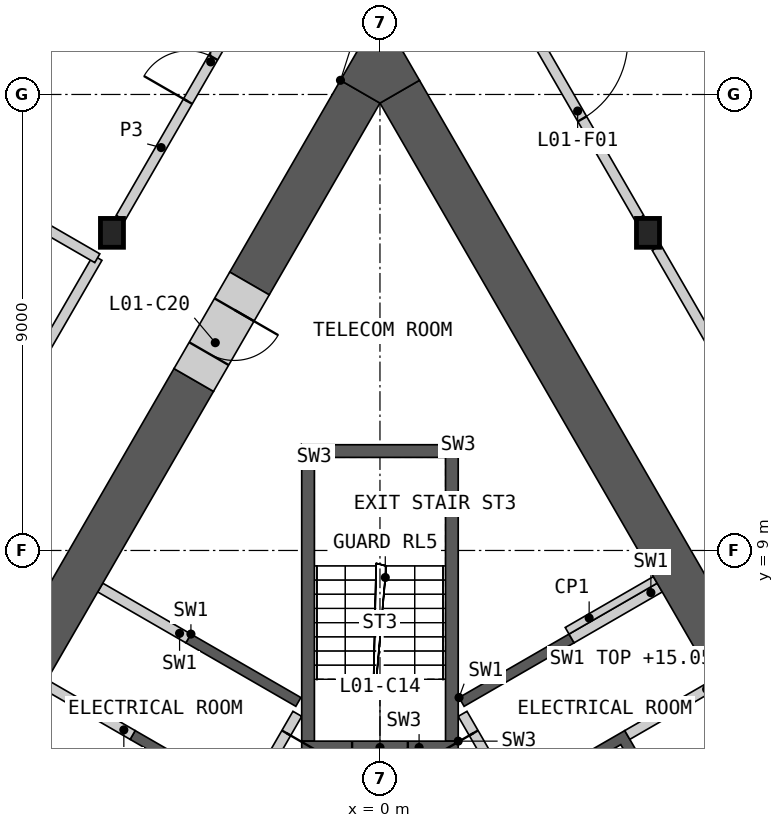
"""IFC4 building model, lengths in metres.
Left out: names, types, materials, properties, quantities, classifications, styles, units other than length and angle.
Written with IfcOpenShell. Run it as: python <this file> out.ifc"""

import sys

from ifc_helpers import new_model, si_unit, direction, frame, frame_2d, origin, origin_2d, place, context, subcontext, project, spatial, polyline, rectangle, i_section, outline, extrude, element, fill, save


model = new_model("IFC4")
c1 = context("Model", 3, precision=1e-05, world=origin(), true_north=direction((0.0, 1.0)))
c2 = subcontext(c1, "Body", "Model", "MODEL_VIEW")
j1 = project(units=[si_unit("LENGTHUNIT", "METRE"), si_unit("PLANEANGLEUNIT", "RADIAN")], contexts=[c1])
p1 = place(None, origin())
s1 = spatial("IfcSite", under=j1, at=p1, CompositionType="ELEMENT")
p2 = place(p1, origin())
s2 = spatial("IfcBuilding", under=s1, at=p2, CompositionType="ELEMENT")
p3 = place(p2, frame((0.0, 0.0, 10.0)))
s3 = spatial("IfcBuildingStorey", under=s2, at=p3, CompositionType="ELEMENT", Elevation=10.0)
for number, where, z_axis, x_axis in (
    (1, (-5.289, 15.269, 0.0), (0.0, 0.0, 1.0), (1.0, 0.0, 0.0)),
    (2, (5.289, 15.269, 0.0), (0.0, 0.0, 1.0), (1.0, 0.0, 0.0)),
):
    element("IfcColumn", number, at=place(p3, frame(where, z_axis=z_axis, x_axis=x_axis)), inside=s3, PredefinedType="COLUMN", context=c2, shape_type="SweptSolid", body=[
        extrude(i_section(OverallWidth=0.454, OverallDepth=0.57, WebThickness=0.078, FlangeThickness=0.125, at=origin_2d()), origin(), (0.0, 0.0, 1.0), 5.5),
    ])
p4 = place(p3, origin())
e3 = element("IfcWall", 3, at=p4, inside=s3, PredefinedType="SHEAR", context=c2, shape_type="SweptSolid", body=[
    extrude(outline(polyline([(1.561, 6.097), (3.731, 7.35), (3.831, 7.177), (1.66, 5.924), (1.561, 6.097)])), origin(), (0.0, 0.0, 1.0), 5.05),
])
p5 = place(p3, origin())
e4 = element("IfcWall", 4, at=p5, inside=s3, PredefinedType="SHEAR", context=c2, shape_type="SweptSolid", body=[
    extrude(outline(polyline([(2.66, 4.192), (4.831, 5.445), (8.231, -0.444), (6.061, -1.697), (5.96, -1.524), (7.952, -0.374), (6.952, 1.358), (4.96, 0.208), (4.861, 0.381), (6.852, 1.531), (5.852, 3.263), (3.861, 2.113), (3.76, 2.287), (5.752, 3.437), (4.752, 5.169), (2.76, 4.019), (2.66, 4.192)])), origin(), (0.0, 0.0, 1.0), 5.05),
])
p6 = place(p3, frame((5.817, -1.476, 0.0), z_axis=(0.0, 0.0, 1.0), x_axis=(-0.500002616675, 0.866023893041, 0.0)))
e5 = element("IfcWall", 5, at=p6, inside=s3, PredefinedType="SOLIDWALL", context=c2, shape_type="SweptSolid", body=[
    extrude(rectangle(XDim=8.373, YDim=0.2, at=frame_2d((4.187, 0.0))), origin(), (0.0, 0.0, 1.0), 5.05),
])
p7 = place(p6, frame((0.337, 0.0, 0.0)))
e6 = element("IfcOpeningElement", 6, at=p7, cuts=e5, PredefinedType="OPENING", context=c2, shape_type="SweptSolid", body=[
    extrude(rectangle(XDim=1.1, YDim=2.1, at=frame_2d((0.55, 1.05))), frame((0.0, 0.11, 0.0), z_axis=(0.0, -1.0, 0.0), x_axis=(1.0, 0.0, 0.0)), (0.0, 0.0, 1.0), 0.22),
])
p8 = place(p6, frame((2.537, 0.0, 0.0)))
e7 = element("IfcOpeningElement", 7, at=p8, cuts=e5, PredefinedType="OPENING", context=c2, shape_type="SweptSolid", body=[
    extrude(rectangle(XDim=1.1, YDim=2.1, at=frame_2d((0.55, 1.05))), frame((0.0, 0.11, 0.0), z_axis=(0.0, -1.0, 0.0), x_axis=(1.0, 0.0, 0.0)), (0.0, 0.0, 1.0), 0.22),
])
p9 = place(p6, frame((4.737, 0.0, 0.0)))
e8 = element("IfcOpeningElement", 8, at=p9, cuts=e5, PredefinedType="OPENING", context=c2, shape_type="SweptSolid", body=[
    extrude(rectangle(XDim=1.1, YDim=2.1, at=frame_2d((0.55, 1.05))), frame((0.0, 0.11, 0.0), z_axis=(0.0, -1.0, 0.0), x_axis=(1.0, 0.0, 0.0)), (0.0, 0.0, 1.0), 0.22),
])
p10 = place(p6, frame((7.037, 0.0, 0.0)))
e9 = element("IfcOpeningElement", 9, at=p10, cuts=e5, PredefinedType="OPENING", context=c2, shape_type="SweptSolid", body=[
    extrude(rectangle(XDim=0.9, YDim=2.1, at=frame_2d((0.45, 1.05))), frame((0.0, 0.11, 0.0), z_axis=(0.0, -1.0, 0.0), x_axis=(1.0, 0.0, 0.0)), (0.0, 0.0, 1.0), 0.22),
])
p11 = place(p3, frame((4.881, 5.358, 0.0), z_axis=(0.0, 0.0, 1.0), x_axis=(0.866035824272, 0.499981950752, 0.0)))
e10 = element("IfcWall", 10, at=p11, inside=s3, PredefinedType="SHEAR", context=c2, shape_type="SweptSolid", body=[
    extrude(rectangle(XDim=2.009, YDim=0.2, at=frame_2d((1.004, 0.0))), origin(), (0.0, 0.0, 1.0), 5.05),
])
p12 = place(p3, frame((3.781, 7.263, 0.0), z_axis=(0.0, 0.0, 1.0), x_axis=(0.865983199114, 0.50007309351, 0.0)))
e11 = element("IfcWall", 11, at=p12, inside=s3, PredefinedType="SHEAR", context=c2, shape_type="SweptSolid", body=[
    extrude(rectangle(XDim=2.009, YDim=0.2, at=frame_2d((1.004, 0.0))), origin(), (0.0, 0.0, 1.0), 5.05),
])
p13 = place(p3, origin())
e12 = element("IfcWall", 12, at=p13, inside=s3, PredefinedType="SHEAR", context=c2, shape_type="SweptSolid", body=[
    extrude(outline(polyline([(-2.76, 4.019), (-4.931, 5.272), (-4.831, 5.445), (-2.66, 4.192), (-2.76, 4.019)])), origin(), (0.0, 0.0, 1.0), 5.05),
])
p14 = place(p3, origin())
e13 = element("IfcWall", 13, at=p14, inside=s3, PredefinedType="SHEAR", context=c2, shape_type="SweptSolid", body=[
    extrude(outline(polyline([(-3.731, 7.35), (-1.561, 6.097), (-1.66, 5.924), (-3.831, 7.177), (-3.731, 7.35)])), origin(), (0.0, 0.0, 1.0), 5.05),
])
p15 = place(p3, frame((-1.631, 5.776, 0.0), z_axis=(0.0, 0.0, 1.0), x_axis=(-0.499992876559, -0.866029516466, 0.0)))
e14 = element("IfcWall", 14, at=p15, inside=s3, PredefinedType="SOLIDWALL", context=c2, shape_type="SweptSolid", body=[
    extrude(rectangle(XDim=6.486, YDim=0.2, at=frame_2d((3.243, 0.0))), origin(), (0.0, 0.0, 1.0), 5.05),
])
p16 = place(p15, frame((0.437, 0.0, 0.0)))
e15 = element("IfcOpeningElement", 15, at=p16, cuts=e14, PredefinedType="OPENING", context=c2, shape_type="SweptSolid", body=[
    extrude(rectangle(XDim=0.9, YDim=2.1, at=frame_2d((0.45, 1.05))), frame((0.0, 0.11, 0.0), z_axis=(0.0, -1.0, 0.0), x_axis=(1.0, 0.0, 0.0)), (0.0, 0.0, 1.0), 0.22),
])
p17 = place(p15, frame((2.637, 0.0, 0.0)))
e16 = element("IfcOpeningElement", 16, at=p17, cuts=e14, PredefinedType="OPENING", context=c2, shape_type="SweptSolid", body=[
    extrude(rectangle(XDim=0.9, YDim=2.1, at=frame_2d((0.45, 1.05))), frame((0.0, 0.11, 0.0), z_axis=(0.0, -1.0, 0.0), x_axis=(1.0, 0.0, 0.0)), (0.0, 0.0, 1.0), 0.22),
])
p18 = place(p3, frame((-3.781, 7.263, 0.0), z_axis=(0.0, 0.0, 1.0), x_axis=(-0.865983199114, 0.50007309351, 0.0)))
e17 = element("IfcWall", 17, at=p18, inside=s3, PredefinedType="SHEAR", context=c2, shape_type="SweptSolid", body=[
    extrude(rectangle(XDim=2.009, YDim=0.2, at=frame_2d((1.004, 0.0))), origin(), (0.0, 0.0, 1.0), 5.05),
])
p19 = place(p3, frame((-4.881, 5.358, 0.0), z_axis=(0.0, 0.0, 1.0), x_axis=(-0.866035824272, 0.499981950752, 0.0)))
e18 = element("IfcWall", 18, at=p19, inside=s3, PredefinedType="SHEAR", context=c2, shape_type="SweptSolid", body=[
    extrude(rectangle(XDim=2.009, YDim=0.2, at=frame_2d((1.004, 0.0))), origin(), (0.0, 0.0, 1.0), 5.05),
])
p20 = place(p3, origin())
e19 = element("IfcWall", 19, at=p20, inside=s3, PredefinedType="SHEAR", context=c2, shape_type="SweptSolid", body=[
    extrude(outline(polyline([(1.544, 5.237), (1.544, 11.087), (1.294, 10.837), (1.294, 5.237), (1.544, 5.237)])), origin(), (0.0, 0.0, 1.0), 5.05),
])
p21 = place(p3, origin())
e20 = element("IfcWall", 20, at=p21, inside=s3, PredefinedType="SHEAR", context=c2, shape_type="SweptSolid", body=[
    extrude(outline(polyline([(1.544, 11.087), (-1.544, 11.087), (-1.294, 10.837), (1.294, 10.837), (1.544, 11.087)])), origin(), (0.0, 0.0, 1.0), 5.05),
])
p22 = place(p3, origin())
e21 = element("IfcWall", 21, at=p22, inside=s3, PredefinedType="SHEAR", context=c2, shape_type="SweptSolid", body=[
    extrude(outline(polyline([(-1.294, 10.837), (-1.544, 11.087), (-1.544, 5.237), (-1.294, 5.237), (-1.294, 10.837)])), origin(), (0.0, 0.0, 1.0), 5.05),
])
p23 = place(p3, frame((1.544, 5.112, 0.0), z_axis=(0.0, 0.0, 1.0), x_axis=(-1.0, 0.0, 0.0)))
e22 = element("IfcWall", 22, at=p23, inside=s3, PredefinedType="SHEAR", context=c2, shape_type="SweptSolid", body=[
    extrude(rectangle(XDim=3.088, YDim=0.25, at=frame_2d((1.544, 0.0))), origin(), (0.0, 0.0, 1.0), 5.05),
])
p24 = place(p23, frame((0.994, 0.0, 0.0)))
e23 = element("IfcOpeningElement", 23, at=p24, cuts=e22, PredefinedType="OPENING", context=c2, shape_type="SweptSolid", body=[
    extrude(rectangle(XDim=1.1, YDim=2.1, at=frame_2d((0.55, 1.05))), frame((0.0, 0.135, 0.0), z_axis=(0.0, -1.0, 0.0), x_axis=(1.0, 0.0, 0.0)), (0.0, 0.0, 1.0), 0.27),
])
p25 = place(p3, frame((3.693, 7.415, 0.0), z_axis=(0.0, 0.0, 1.0), x_axis=(0.866035824272, 0.499981950752, 0.0)))
e24 = element("IfcWall", 24, at=p25, inside=s3, PredefinedType="PARTITIONING", context=c2, shape_type="SweptSolid", body=[
    extrude(rectangle(XDim=2.009, YDim=0.15, at=frame_2d((1.004, 0.0))), origin(), (0.0, 0.0, 1.0), 5.05),
])
p26 = place(p3, frame((8.16, 4.596, 0.0), z_axis=(0.0, 0.0, 1.0), x_axis=(-0.500009830349, 0.866019728156, 0.0)))
e25 = element("IfcWall", 25, at=p26, inside=s3, PredefinedType="SHEAR", context=c2, shape_type="SweptSolid", body=[
    extrude(rectangle(XDim=15.541, YDim=0.9, at=frame_2d((7.771, 0.0))), origin(), (0.0, 0.0, 1.0), 5.05),
])
p27 = place(p3, frame((-3.675, 12.365, 0.0), z_axis=(0.0, 0.0, 1.0), x_axis=(-0.500014716158, -0.86601690724, 0.0)))
e26 = element("IfcWall", 26, at=p27, inside=s3, PredefinedType="SHEAR", context=c2, shape_type="SweptSolid", body=[
    extrude(rectangle(XDim=8.99, YDim=0.9, at=frame_2d((4.495, 0.0))), origin(), (0.0, 0.0, 1.0), 5.05),
])
p28 = place(p3, frame((-0.39, 18.055, 0.0), z_axis=(0.0, 0.0, 1.0), x_axis=(-0.500014193307, -0.86601720912, 0.0)))
e27 = element("IfcWall", 27, at=p28, inside=s3, PredefinedType="SHEAR", context=c2, shape_type="SweptSolid", body=[
    extrude(rectangle(XDim=4.37, YDim=0.9, at=frame_2d((2.185, 0.0))), origin(), (0.0, 0.0, 1.0), 5.05),
])
p29 = place(p3, origin())
e28 = element("IfcWall", 28, at=p29, inside=s3, PredefinedType="SHEAR", context=c2, shape_type="SweptSolid", body=[
    extrude(outline(polyline([(-0.779, 18.28), (0.0, 19.63), (0.779, 18.28), (0.0, 17.83), (-0.779, 18.28)])), origin(), (0.0, 0.0, 1.0), 5.05),
])
p30 = place(p3, frame((-2.575, 14.27, 0.0), z_axis=(0.0, 0.0, 1.0), x_axis=(-0.499981787252, -0.866035918664, 0.0)))
e29 = element("IfcWall", 29, at=p30, inside=s3, PredefinedType="SHEAR", context=c2, shape_type="SweptSolid", body=[
    extrude(rectangle(XDim=2.2, YDim=0.9, at=frame_2d((1.1, 0.0))), origin(), (0.0, 0.0, 1.0), 5.05),
])
p31 = place(p30, frame((0.6, 0.0, 0.0)))
e30 = element("IfcOpeningElement", 30, at=p31, cuts=e29, PredefinedType="OPENING", context=c2, shape_type="SweptSolid", body=[
    extrude(rectangle(XDim=1.0, YDim=2.1, at=frame_2d((0.5, 1.05))), frame((0.0, 0.46, 0.0), z_axis=(0.0, -1.0, 0.0), x_axis=(1.0, 0.0, 0.0)), (0.0, 0.0, 1.0), 0.92),
])
p32 = place(p3, frame((5.459, 14.974, 0.0), z_axis=(0.0, 0.0, 1.0), x_axis=(0.499985793049, -0.866033606016, 0.0)))
e31 = element("IfcWall", 31, at=p32, inside=s3, PredefinedType="PARTITIONING", context=c2, shape_type="SweptSolid", body=[
    extrude(rectangle(XDim=9.898, YDim=0.2, at=frame_2d((4.949, 0.0))), origin(), (0.0, 0.0, 1.0), 5.05),
])
p33 = place(p3, frame((-10.408, 6.402, 0.0), z_axis=(0.0, 0.0, 1.0), x_axis=(0.499986904098, 0.866032964575, 0.0)))
e32 = element("IfcWall", 32, at=p33, inside=s3, PredefinedType="PARTITIONING", context=c2, shape_type="SweptSolid", body=[
    extrude(rectangle(XDim=9.67, YDim=0.2, at=frame_2d((4.835, 0.0))), origin(), (0.0, 0.0, 1.0), 5.05),
])
p34 = place(p33, frame((3.884, 0.0, 0.0)))
e33 = element("IfcOpeningElement", 33, at=p34, cuts=e32, PredefinedType="OPENING", context=c2, shape_type="SweptSolid", body=[
    extrude(rectangle(XDim=1.8, YDim=2.1, at=frame_2d((0.9, 1.05))), frame((0.0, 0.11, 0.0), z_axis=(0.0, -1.0, 0.0), x_axis=(1.0, 0.0, 0.0)), (0.0, 0.0, 1.0), 0.22),
])
p35 = place(p3, frame((1.913, 21.116, 0.0), z_axis=(0.0, 0.0, 1.0), x_axis=(0.500004801114, -0.866022631842, 0.0)))
e34 = element("IfcWall", 34, at=p35, inside=s3, PredefinedType="PARTITIONING", context=c2, shape_type="SweptSolid", body=[
    extrude(rectangle(XDim=6.412, YDim=0.2, at=frame_2d((3.206, 0.0))), origin(), (0.0, 0.0, 1.0), 5.05),
])
p36 = place(p35, frame((2.356, 0.0, 0.0)))
e35 = element("IfcOpeningElement", 35, at=p36, cuts=e34, PredefinedType="OPENING", context=c2, shape_type="SweptSolid", body=[
    extrude(rectangle(XDim=1.8, YDim=2.1, at=frame_2d((0.9, 1.05))), frame((0.0, 0.11, 0.0), z_axis=(0.0, -1.0, 0.0), x_axis=(1.0, 0.0, 0.0)), (0.0, 0.0, 1.0), 0.22),
])
p37 = place(p3, frame((-5.119, 15.563, 0.0), z_axis=(0.0, 0.0, 1.0), x_axis=(0.500004801114, 0.866022631842, 0.0)))
e36 = element("IfcWall", 36, at=p37, inside=s3, PredefinedType="PARTITIONING", context=c2, shape_type="SweptSolid", body=[
    extrude(rectangle(XDim=6.412, YDim=0.2, at=frame_2d((3.206, 0.0))), origin(), (0.0, 0.0, 1.0), 5.05),
])
p38 = place(p37, frame((2.656, 0.0, 0.0)))
e37 = element("IfcOpeningElement", 37, at=p38, cuts=e36, PredefinedType="OPENING", context=c2, shape_type="SweptSolid", body=[
    extrude(rectangle(XDim=1.0, YDim=2.1, at=frame_2d((0.5, 1.05))), frame((0.0, 0.11, 0.0), z_axis=(0.0, -1.0, 0.0), x_axis=(1.0, 0.0, 0.0)), (0.0, 0.0, 1.0), 0.22),
])
p39 = place(p3, frame((-14.31, 19.809, 0.0), z_axis=(0.0, 0.0, 1.0), x_axis=(0.866017018378, -0.500014523669, 0.0)))
e38 = element("IfcWall", 38, at=p39, inside=s3, PredefinedType="PARTITIONING", context=c2, shape_type="SweptSolid", body=[
    extrude(rectangle(XDim=10.082, YDim=0.2, at=frame_2d((5.041, 0.0))), origin(), (0.0, 0.0, 1.0), 5.05),
])
p40 = place(p10, origin())
e39 = element("IfcDoor", 39, at=p40, inside=s3, OperationType="SINGLE_SWING_RIGHT", PredefinedType="DOOR", context=c2, shape_type="SweptSolid", body=[
    extrude(rectangle(XDim=0.9, YDim=2.1, at=frame_2d((0.45, 1.05))), frame((0.0, 0.025, 0.0), z_axis=(0.0, -1.0, 0.0), x_axis=(1.0, 0.0, 0.0)), (0.0, 0.0, 1.0), 0.05),
])
fill(e9, e39)
p41 = place(p16, origin())
e40 = element("IfcDoor", 40, at=p41, inside=s3, OperationType="SINGLE_SWING_LEFT", PredefinedType="DOOR", context=c2, shape_type="SweptSolid", body=[
    extrude(rectangle(XDim=0.9, YDim=2.1, at=frame_2d((0.45, 1.05))), frame((0.0, 0.025, 0.0), z_axis=(0.0, -1.0, 0.0), x_axis=(1.0, 0.0, 0.0)), (0.0, 0.0, 1.0), 0.05),
])
fill(e15, e40)
p42 = place(p24, origin())
e41 = element("IfcDoor", 41, at=p42, inside=s3, OperationType="SINGLE_SWING_LEFT", PredefinedType="DOOR", context=c2, shape_type="SweptSolid", body=[
    extrude(rectangle(XDim=1.1, YDim=2.1, at=frame_2d((0.55, 1.05))), frame((0.0, 0.025, 0.0), z_axis=(0.0, -1.0, 0.0), x_axis=(1.0, 0.0, 0.0)), (0.0, 0.0, 1.0), 0.05),
])
fill(e23, e41)
p43 = place(p31, origin())
e42 = element("IfcDoor", 42, at=p43, inside=s3, OperationType="SINGLE_SWING_LEFT", PredefinedType="DOOR", context=c2, shape_type="SweptSolid", body=[
    extrude(rectangle(XDim=1.0, YDim=2.1, at=frame_2d((0.5, 1.05))), frame((0.0, 0.205, 0.0), z_axis=(0.0, -1.0, 0.0), x_axis=(1.0, 0.0, 0.0)), (0.0, 0.0, 1.0), 0.05),
])
fill(e30, e42)
p44 = place(p36, origin())
e43 = element("IfcDoor", 43, at=p44, inside=s3, OperationType="DOUBLE_DOOR_SINGLE_SWING", PredefinedType="DOOR", context=c2, shape_type="SweptSolid", body=[
    extrude(rectangle(XDim=1.8, YDim=2.1, at=frame_2d((0.9, 1.05))), frame((0.0, 0.025, 0.0), z_axis=(0.0, -1.0, 0.0), x_axis=(1.0, 0.0, 0.0)), (0.0, 0.0, 1.0), 0.05),
])
fill(e35, e43)
p45 = place(p38, origin())
e44 = element("IfcDoor", 44, at=p45, inside=s3, OperationType="SINGLE_SWING_LEFT", PredefinedType="DOOR", context=c2, shape_type="SweptSolid", body=[
    extrude(rectangle(XDim=1.0, YDim=2.1, at=frame_2d((0.5, 1.05))), frame((0.0, 0.025, 0.0), z_axis=(0.0, -1.0, 0.0), x_axis=(1.0, 0.0, 0.0)), (0.0, 0.0, 1.0), 0.05),
])
fill(e37, e44)
save(model, sys.argv[1])
